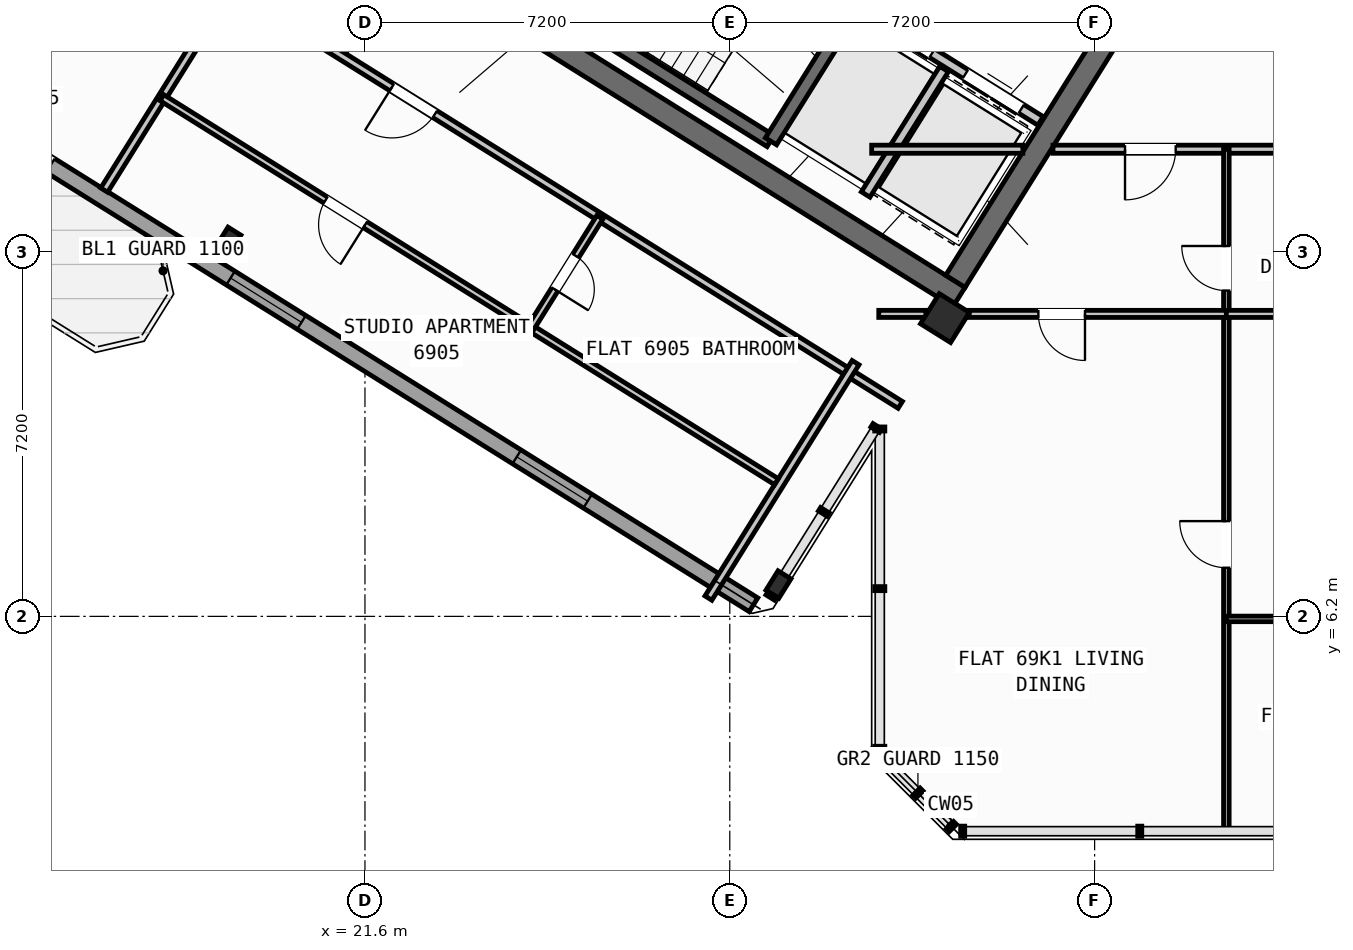
"""IFC4 building model, lengths in metres.
Left out: names, types, materials, properties, quantities, classifications, styles, units other than length and angle.
Written with IfcOpenShell. Run it as: python <this file> out.ifc"""

import sys

from ifc_helpers import new_model, si_unit, direction, frame, frame_2d, origin, origin_2d, place, context, subcontext, project, spatial, rectangle, hollow_rectangle, i_section, extrude, source, transform, mapped, element, fill, save


model = new_model("IFC4")
c1 = context("Model", 3, precision=1e-05, world=origin(), true_north=direction((0.0, 1.0)))
c2 = subcontext(c1, "Body", "Model", "MODEL_VIEW")
j1 = project(units=[si_unit("LENGTHUNIT", "METRE"), si_unit("PLANEANGLEUNIT", "RADIAN")], contexts=[c1])
p1 = place(None, origin())
s1 = spatial("IfcSite", under=j1, at=p1, CompositionType="ELEMENT")
p2 = place(p1, origin())
s2 = spatial("IfcBuilding", under=s1, at=p2, CompositionType="ELEMENT")
p3 = place(p2, frame((0.0, 0.0, 273.6)))
s3 = spatial("IfcBuildingStorey", under=s2, at=p3, CompositionType="ELEMENT", Elevation=273.6)
p4 = place(p3, frame((33.324, 12.503, 0.0), z_axis=(0.0, 0.0, 1.0), x_axis=(-0.848043529849, 0.529926571782, 0.0)))
e1 = element("IfcWall", 1, at=p4, inside=s3, PredefinedType="SHEAR", context=c2, shape_type="SweptSolid", body=[
    extrude(rectangle(XDim=13.04, YDim=0.45, at=frame_2d((6.52, 0.0))), origin(), (0.0, 0.0, 1.0), 3.35),
])
p5 = place(p3, frame((36.683, 18.304, 0.0), z_axis=(0.0, 0.0, 1.0), x_axis=(-0.529904039071, -0.848057609704, 0.0)))
e2 = element("IfcWall", 2, at=p5, inside=s3, PredefinedType="SHEAR", context=c2, shape_type="SweptSolid", body=[
    extrude(rectangle(XDim=6.475, YDim=0.45, at=frame_2d((3.238, 0.0))), origin(), (0.0, 0.0, 1.0), 3.35),
])
m1 = source(origin(), c2, "Body", "SweptSolid", [
    extrude(hollow_rectangle(XDim=0.7, YDim=0.7, WallThickness=0.028, at=origin_2d()), origin(), (0.0, 0.0, 1.0), 3.6),
])
p6 = place(p3, frame((33.046, 12.087, 0.0), z_axis=(0.0, 0.0, 1.0), x_axis=(-0.848048096156, 0.529919264233, 0.0)))
e3 = element("IfcColumn", 3, at=p6, inside=s3, PredefinedType="COLUMN", context=c2, shape_type="MappedRepresentation", body=[
    mapped(m1, transform((0.0, 0.0, 0.0), scale=1.0)),
])
m2 = source(origin(), c2, "Body", "SweptSolid", [
    extrude(i_section(OverallWidth=0.3, OverallDepth=0.45, WebThickness=0.014, FlangeThickness=0.026, at=origin_2d()), origin(), (0.0, 0.0, 1.0), 3.6),
])
for number, where, z_axis, x_axis in (
    (4, (29.761, 6.829, 0.0), (0.0, 0.0, 1.0), (-0.848, 0.53, 0.0)),
    (5, (18.906, 13.612, 0.0), (0.0, 0.0, 1.0), (-0.848, 0.53, 0.0)),
):
    element("IfcColumn", number, at=place(p3, frame(where, z_axis=z_axis, x_axis=x_axis)), inside=s3, PredefinedType="COLUMN", context=c2, shape_type="MappedRepresentation", body=[
        mapped(m2, transform((0.0, 0.0, 0.0), scale=1.0)),
    ])
p7 = place(p3, frame((29.268, 6.429, 0.0), z_axis=(0.0, 0.0, 1.0), x_axis=(-0.848049971435, 0.529916263149, 0.0)))
e6 = element("IfcWall", 6, at=p7, inside=s3, PredefinedType="STANDARD", context=c2, shape_type="SweptSolid", body=[
    extrude(rectangle(XDim=31.588, YDim=0.32, at=frame_2d((15.794, 0.0))), origin(), (0.0, 0.0, 1.0), 3.35),
])
p8 = place(p7, frame((16.362, 0.0, 0.0)))
e7 = element("IfcOpeningElement", 7, at=p8, cuts=e6, PredefinedType="OPENING", context=c2, shape_type="SweptSolid", body=[
    extrude(rectangle(XDim=1.2, YDim=2.15, at=frame_2d((0.6, 1.075))), frame((0.0, 0.17, 0.0), z_axis=(0.0, -1.0, 0.0), x_axis=(1.0, 0.0, 0.0)), (0.0, 0.0, 1.0), 0.34),
])
p9 = place(p7, frame((3.859, 0.0, 0.9)))
e8 = element("IfcOpeningElement", 8, at=p9, cuts=e6, PredefinedType="OPENING", context=c2, shape_type="SweptSolid", body=[
    extrude(rectangle(XDim=1.65, YDim=1.45, at=frame_2d((0.825, 0.725))), frame((0.0, 0.17, 0.0), z_axis=(0.0, -1.0, 0.0), x_axis=(1.0, 0.0, 0.0)), (0.0, 0.0, 1.0), 0.34),
])
p10 = place(p7, frame((10.519, 0.0, 0.9)))
e9 = element("IfcOpeningElement", 9, at=p10, cuts=e6, PredefinedType="OPENING", context=c2, shape_type="SweptSolid", body=[
    extrude(rectangle(XDim=1.65, YDim=1.45, at=frame_2d((0.825, 0.725))), frame((0.0, 0.17, 0.0), z_axis=(0.0, -1.0, 0.0), x_axis=(1.0, 0.0, 0.0)), (0.0, 0.0, 1.0), 0.34),
])
p11 = place(p7, frame((21.219, 0.0, 0.95)))
e10 = element("IfcOpeningElement", 10, at=p11, cuts=e6, PredefinedType="OPENING", context=c2, shape_type="SweptSolid", body=[
    extrude(rectangle(XDim=1.95, YDim=1.35, at=frame_2d((0.975, 0.675))), frame((0.0, 0.17, 0.0), z_axis=(0.0, -1.0, 0.0), x_axis=(1.0, 0.0, 0.0)), (0.0, 0.0, 1.0), 0.34),
])
p12 = place(p7, frame((26.406, 0.0, 1.0)))
e11 = element("IfcOpeningElement", 11, at=p12, cuts=e6, PredefinedType="OPENING", context=c2, shape_type="SweptSolid", body=[
    extrude(rectangle(XDim=0.9, YDim=1.25, at=frame_2d((0.45, 0.625))), frame((0.0, 0.17, 0.0), z_axis=(0.0, -1.0, 0.0), x_axis=(1.0, 0.0, 0.0)), (0.0, 0.0, 1.0), 0.34),
])
p13 = place(p7, frame((29.143, 0.0, 0.9)))
e12 = element("IfcOpeningElement", 12, at=p13, cuts=e6, PredefinedType="OPENING", context=c2, shape_type="SweptSolid", body=[
    extrude(rectangle(XDim=1.65, YDim=1.45, at=frame_2d((0.825, 0.725))), frame((0.0, 0.17, 0.0), z_axis=(0.0, -1.0, 0.0), x_axis=(1.0, 0.0, 0.0)), (0.0, 0.0, 1.0), 0.34),
])
p14 = place(p3, frame((29.605, 15.581, 0.0), z_axis=(0.0, 0.0, 1.0), x_axis=(-0.848036911448, 0.529937163087, 0.0)))
e13 = element("IfcWall", 13, at=p14, inside=s3, PredefinedType="SHEAR", context=c2, shape_type="SweptSolid", body=[
    extrude(rectangle(XDim=7.46, YDim=0.26, at=frame_2d((3.73, 0.0))), origin(), (0.0, 0.0, 1.0), 3.35),
])
p15 = place(p3, frame((31.288, 18.256, 0.0), z_axis=(0.0, 0.0, 1.0), x_axis=(-0.529943379326, -0.848033026897, 0.0)))
e14 = element("IfcWall", 14, at=p15, inside=s3, PredefinedType="SHEAR", context=c2, shape_type="SweptSolid", body=[
    extrude(rectangle(XDim=3.16, YDim=0.26, at=frame_2d((1.58, 0.0))), origin(), (0.0, 0.0, 1.0), 3.35),
])
p16 = place(p3, frame((34.933, 15.978, 0.0), z_axis=(0.0, 0.0, 1.0), x_axis=(-0.848055739377, 0.529907032327, 0.0)))
e15 = element("IfcWall", 15, at=p16, inside=s3, PredefinedType="STANDARD", context=c2, shape_type="SweptSolid", body=[
    extrude(rectangle(XDim=4.298, YDim=0.2, at=frame_2d((2.149, 0.0))), origin(), (0.0, 0.0, 1.0), 3.34),
])
p17 = place(p16, frame((0.448, 0.0, 0.0)))
e16 = element("IfcOpeningElement", 16, at=p17, cuts=e15, PredefinedType="OPENING", context=c2, shape_type="SweptSolid", body=[
    extrude(rectangle(XDim=1.3, YDim=2.2, at=frame_2d((0.65, 1.1))), frame((0.0, 0.11, 0.0), z_axis=(0.0, -1.0, 0.0), x_axis=(1.0, 0.0, 0.0)), (0.0, 0.0, 1.0), 0.22),
])
p18 = place(p16, frame((2.523, 0.0, 0.0)))
e17 = element("IfcOpeningElement", 17, at=p18, cuts=e15, PredefinedType="OPENING", context=c2, shape_type="SweptSolid", body=[
    extrude(rectangle(XDim=1.45, YDim=2.25, at=frame_2d((0.725, 1.125))), frame((0.0, 0.11, 0.0), z_axis=(0.0, -1.0, 0.0), x_axis=(1.0, 0.0, 0.0)), (0.0, 0.0, 1.0), 0.22),
])
p19 = place(p3, frame((33.029, 17.003, 0.0), z_axis=(0.0, 0.0, 1.0), x_axis=(-0.529916267533, -0.848049968695, 0.0)))
e18 = element("IfcWall", 18, at=p19, inside=s3, PredefinedType="STANDARD", context=c2, shape_type="SweptSolid", body=[
    extrude(rectangle(XDim=2.92, YDim=0.2, at=frame_2d((1.46, 0.0))), origin(), (0.0, 0.0, 1.0), 3.34),
])
p20 = place(p3, frame((21.206, 17.292, 0.0), z_axis=(0.0, 0.0, 1.0), x_axis=(-0.848050851465, 0.529914854792, 0.0)))
e19 = element("IfcWall", 19, at=p20, inside=s3, PredefinedType="PARTITIONING", context=c2, shape_type="SweptSolid", body=[
    extrude(rectangle(XDim=2.61, YDim=0.16, at=frame_2d((1.305, 0.0))), origin(), (0.0, 0.0, 1.0), 3.34),
])
p21 = place(p3, frame((21.329, 22.416, 0.0), z_axis=(0.0, 0.0, 1.0), x_axis=(-0.529920220799, -0.848047498427, 0.0)))
e20 = element("IfcWall", 20, at=p21, inside=s3, PredefinedType="PARTITIONING", context=c2, shape_type="SweptSolid", body=[
    extrude(rectangle(XDim=9.2, YDim=0.16, at=frame_2d((4.6, 0.0))), origin(), (0.0, 0.0, 1.0), 3.34),
])
p22 = place(p3, frame((16.572, 21.954, 0.0), z_axis=(0.0, 0.0, 1.0), x_axis=(-0.529904903214, -0.848057069748, 0.0)))
e21 = element("IfcWall", 21, at=p22, inside=s3, PredefinedType="PARTITIONING", context=c2, shape_type="SweptSolid", body=[
    extrude(rectangle(XDim=5.601, YDim=0.16, at=frame_2d((2.801, 0.0))), origin(), (0.0, 0.0, 1.0), 2.875),
])
p23 = place(p3, frame((32.164, 10.374, 0.0), z_axis=(0.0, 0.0, 1.0), x_axis=(-0.848044107957, 0.529925646633, 0.0)))
e22 = element("IfcWall", 22, at=p23, inside=s3, PredefinedType="PARTITIONING", context=c2, shape_type="SweptSolid", body=[
    extrude(rectangle(XDim=15.57, YDim=0.16, at=frame_2d((7.785, 0.0))), origin(), (0.0, 0.0, 1.0), 3.34),
])
p24 = place(p23, frame((10.83, 0.0, 0.0)))
e23 = element("IfcOpeningElement", 23, at=p24, cuts=e22, PredefinedType="OPENING", context=c2, shape_type="SweptSolid", body=[
    extrude(rectangle(XDim=1.0, YDim=2.1, at=frame_2d((0.5, 1.05))), frame((0.0, 0.09, 0.0), z_axis=(0.0, -1.0, 0.0), x_axis=(1.0, 0.0, 0.0)), (0.0, 0.0, 1.0), 0.18),
])
p25 = place(p3, frame((31.282, 11.208, 0.0), z_axis=(0.0, 0.0, 1.0), x_axis=(-0.529938869374, -0.84803584519, 0.0)))
e24 = element("IfcWall", 24, at=p25, inside=s3, PredefinedType="PARTITIONING", context=c2, shape_type="SweptSolid", body=[
    extrude(rectangle(XDim=5.48, YDim=0.16, at=frame_2d((2.74, 0.0))), origin(), (0.0, 0.0, 1.0), 3.34),
])
p26 = place(p3, frame((29.72, 8.859, 0.0), z_axis=(0.0, 0.0, 1.0), x_axis=(-0.848049134363, 0.529917602752, 0.0)))
e25 = element("IfcWall", 25, at=p26, inside=s3, PredefinedType="PLUMBINGWALL", context=c2, shape_type="SweptSolid", body=[
    extrude(rectangle(XDim=14.3, YDim=0.14, at=frame_2d((7.15, 0.0))), origin(), (0.0, 0.0, 1.0), 3.34),
])
p27 = place(p26, frame((9.57, 0.0, 0.0)))
e26 = element("IfcOpeningElement", 26, at=p27, cuts=e25, PredefinedType="OPENING", context=c2, shape_type="SweptSolid", body=[
    extrude(rectangle(XDim=0.92, YDim=2.08, at=frame_2d((0.46, 1.04))), frame((0.0, 0.08, 0.0), z_axis=(0.0, -1.0, 0.0), x_axis=(1.0, 0.0, 0.0)), (0.0, 0.0, 1.0), 0.16),
])
p28 = place(p3, frame((26.237, 14.078, 0.0), z_axis=(0.0, 0.0, 1.0), x_axis=(-0.52995640672, -0.848024885824, 0.0)))
e27 = element("IfcWall", 27, at=p28, inside=s3, PredefinedType="PLUMBINGWALL", context=c2, shape_type="SweptSolid", body=[
    extrude(rectangle(XDim=2.58, YDim=0.14, at=frame_2d((1.29, 0.0))), origin(), (0.0, 0.0, 1.0), 3.34),
])
p29 = place(p28, frame((0.9, 0.0, 0.0)))
e28 = element("IfcOpeningElement", 28, at=p29, cuts=e27, PredefinedType="OPENING", context=c2, shape_type="SweptSolid", body=[
    extrude(rectangle(XDim=0.78, YDim=2.05, at=frame_2d((0.39, 1.025))), frame((0.0, 0.08, 0.0), z_axis=(0.0, -1.0, 0.0), x_axis=(1.0, 0.0, 0.0)), (0.0, 0.0, 1.0), 0.16),
])
p30 = place(p3, frame((31.6, 15.42, 0.0), z_axis=(0.0, 0.0, 1.0), x_axis=(1.0, 0.0, 0.0)))
e29 = element("IfcWall", 29, at=p30, inside=s3, PredefinedType="PARTITIONING", context=c2, shape_type="SweptSolid", body=[
    extrude(rectangle(XDim=2.984, YDim=0.16, at=frame_2d((1.492, 0.0))), origin(), (0.0, 0.0, 1.0), 3.34),
])
p31 = place(p3, frame((35.178, 15.42, 0.0), z_axis=(0.0, 0.0, 1.0), x_axis=(1.0, 0.0, 0.0)))
e30 = element("IfcWall", 30, at=p31, inside=s3, PredefinedType="PARTITIONING", context=c2, shape_type="SweptSolid", body=[
    extrude(rectangle(XDim=9.021, YDim=0.16, at=frame_2d((4.511, 0.0))), origin(), (0.0, 0.0, 1.0), 3.34),
])
p32 = place(p31, frame((1.422, 0.0, 0.0)))
e31 = element("IfcOpeningElement", 31, at=p32, cuts=e30, PredefinedType="OPENING", context=c2, shape_type="SweptSolid", body=[
    extrude(rectangle(XDim=1.0, YDim=2.1, at=frame_2d((0.5, 1.05))), frame((0.0, 0.09, 0.0), z_axis=(0.0, -1.0, 0.0), x_axis=(1.0, 0.0, 0.0)), (0.0, 0.0, 1.0), 0.18),
])
p33 = place(p3, frame((38.6, 1.96, 0.0), z_axis=(0.0, 0.0, 1.0), x_axis=(0.0, 1.0, 0.0)))
e32 = element("IfcWall", 32, at=p33, inside=s3, PredefinedType="PARTITIONING", context=c2, shape_type="SweptSolid", body=[
    extrude(rectangle(XDim=13.46, YDim=0.11, at=frame_2d((6.73, 0.0))), origin(), (0.0, 0.0, 1.0), 3.34),
])
p34 = place(p33, frame((5.2, 0.0, 0.0)))
e33 = element("IfcOpeningElement", 33, at=p34, cuts=e32, PredefinedType="OPENING", context=c2, shape_type="SweptSolid", body=[
    extrude(rectangle(XDim=0.92, YDim=2.08, at=frame_2d((0.46, 1.04))), frame((0.0, 0.065, 0.0), z_axis=(0.0, -1.0, 0.0), x_axis=(1.0, 0.0, 0.0)), (0.0, 0.0, 1.0), 0.13),
])
p35 = place(p33, frame((10.67, 0.0, 0.0)))
e34 = element("IfcOpeningElement", 34, at=p35, cuts=e32, PredefinedType="OPENING", context=c2, shape_type="SweptSolid", body=[
    extrude(rectangle(XDim=0.88, YDim=2.08, at=frame_2d((0.44, 1.04))), frame((0.0, 0.065, 0.0), z_axis=(0.0, -1.0, 0.0), x_axis=(1.0, 0.0, 0.0)), (0.0, 0.0, 1.0), 0.13),
])
p36 = place(p3, frame((31.74, 12.17, 0.0), z_axis=(0.0, 0.0, 1.0), x_axis=(1.0, 0.0, 0.0)))
e35 = element("IfcWall", 35, at=p36, inside=s3, PredefinedType="PLUMBINGWALL", context=c2, shape_type="SweptSolid", body=[
    extrude(rectangle(XDim=0.931, YDim=0.14, at=frame_2d((0.466, 0.0))), origin(), (0.0, 0.0, 1.0), 3.34),
])
p37 = place(p3, frame((33.525, 12.17, 0.0), z_axis=(0.0, 0.0, 1.0), x_axis=(1.0, 0.0, 0.0)))
e36 = element("IfcWall", 36, at=p37, inside=s3, PredefinedType="PLUMBINGWALL", context=c2, shape_type="SweptSolid", body=[
    extrude(rectangle(XDim=5.075, YDim=0.14, at=frame_2d((2.538, 0.0))), origin(), (0.0, 0.0, 1.0), 3.34),
])
p38 = place(p37, frame((1.365, 0.0, 0.0)))
e37 = element("IfcOpeningElement", 37, at=p38, cuts=e36, PredefinedType="OPENING", context=c2, shape_type="SweptSolid", body=[
    extrude(rectangle(XDim=0.92, YDim=2.08, at=frame_2d((0.46, 1.04))), frame((0.0, 0.08, 0.0), z_axis=(0.0, -1.0, 0.0), x_axis=(1.0, 0.0, 0.0)), (0.0, 0.0, 1.0), 0.16),
])
p39 = place(p3, frame((38.6, 12.17, 0.0), z_axis=(0.0, 0.0, 1.0), x_axis=(1.0, 0.0, 0.0)))
e38 = element("IfcWall", 38, at=p39, inside=s3, PredefinedType="PLUMBINGWALL", context=c2, shape_type="SweptSolid", body=[
    extrude(rectangle(XDim=5.46, YDim=0.14, at=frame_2d((2.73, 0.0))), origin(), (0.0, 0.0, 1.0), 3.34),
])
p40 = place(p3, frame((38.6, 6.15, 0.0), z_axis=(0.0, 0.0, 1.0), x_axis=(1.0, 0.0, 0.0)))
e39 = element("IfcWall", 39, at=p40, inside=s3, PredefinedType="PARTITIONING", context=c2, shape_type="SweptSolid", body=[
    extrude(rectangle(XDim=5.46, YDim=0.11, at=frame_2d((2.73, 0.0))), origin(), (0.0, 0.0, 1.0), 3.34),
])
p41 = place(p40, frame((2.19, 0.0, 0.0)))
e40 = element("IfcOpeningElement", 40, at=p41, cuts=e39, PredefinedType="OPENING", context=c2, shape_type="SweptSolid", body=[
    extrude(rectangle(XDim=0.92, YDim=2.08, at=frame_2d((0.46, 1.04))), frame((0.0, 0.065, 0.0), z_axis=(0.0, -1.0, 0.0), x_axis=(1.0, 0.0, 0.0)), (0.0, 0.0, 1.0), 0.13),
])
m3 = source(origin(), c2, "Body", "SweptSolid", [
    extrude(rectangle(XDim=1.65, YDim=1.45, at=frame_2d((0.825, 0.725))), frame((0.0, 0.03, 0.0), z_axis=(0.0, -1.0, 0.0), x_axis=(1.0, 0.0, 0.0)), (0.0, 0.0, 1.0), 0.06),
])
p42 = place(p9, origin())
e41 = element("IfcWindow", 41, at=p42, inside=s3, PartitioningType="SINGLE_PANEL", PredefinedType="WINDOW", context=c2, shape_type="MappedRepresentation", body=[
    mapped(m3, transform((0.0, 0.0, 0.0), scale=1.0)),
])
fill(e8, e41)
p43 = place(p10, origin())
e42 = element("IfcWindow", 42, at=p43, inside=s3, PartitioningType="SINGLE_PANEL", PredefinedType="WINDOW", context=c2, shape_type="MappedRepresentation", body=[
    mapped(m3, transform((0.0, 0.0, 0.0), scale=1.0)),
])
fill(e9, e42)
m4 = source(origin(), c2, "Body", "SweptSolid", [
    extrude(rectangle(XDim=1.3, YDim=2.2, at=frame_2d((0.65, 1.1))), frame((0.0, 0.025, 0.0), z_axis=(0.0, -1.0, 0.0), x_axis=(1.0, 0.0, 0.0)), (0.0, 0.0, 1.0), 0.05),
])
p44 = place(p17, origin())
e43 = element("IfcDoor", 43, at=p44, inside=s3, OperationType="DOUBLE_DOOR_SLIDING", PredefinedType="DOOR", context=c2, shape_type="MappedRepresentation", body=[
    mapped(m4, transform((0.0, 0.0, 0.0), scale=1.0)),
])
fill(e16, e43)
m5 = source(origin(), c2, "Body", "SweptSolid", [
    extrude(rectangle(XDim=1.45, YDim=2.25, at=frame_2d((0.725, 1.125))), frame((0.0, 0.025, 0.0), z_axis=(0.0, -1.0, 0.0), x_axis=(1.0, 0.0, 0.0)), (0.0, 0.0, 1.0), 0.05),
])
p45 = place(p18, origin())
e44 = element("IfcDoor", 44, at=p45, inside=s3, OperationType="DOUBLE_DOOR_SLIDING", PredefinedType="DOOR", context=c2, shape_type="MappedRepresentation", body=[
    mapped(m5, transform((0.0, 0.0, 0.0), scale=1.0)),
])
fill(e17, e44)
m6 = source(origin(), c2, "Body", "SweptSolid", [
    extrude(rectangle(XDim=1.0, YDim=2.1, at=frame_2d((0.5, 1.05))), frame((0.0, 0.025, 0.0), z_axis=(0.0, -1.0, 0.0), x_axis=(1.0, 0.0, 0.0)), (0.0, 0.0, 1.0), 0.05),
])
p46 = place(p24, origin())
e45 = element("IfcDoor", 45, at=p46, inside=s3, OperationType="SINGLE_SWING_RIGHT", PredefinedType="DOOR", context=c2, shape_type="MappedRepresentation", body=[
    mapped(m6, transform((0.0, 0.0, 0.0), scale=1.0)),
])
fill(e23, e45)
m7 = source(origin(), c2, "Body", "SweptSolid", [
    extrude(rectangle(XDim=0.92, YDim=2.08, at=frame_2d((0.46, 1.04))), frame((0.0, 0.025, 0.0), z_axis=(0.0, -1.0, 0.0), x_axis=(1.0, 0.0, 0.0)), (0.0, 0.0, 1.0), 0.05),
])
p47 = place(p27, origin())
e46 = element("IfcDoor", 46, at=p47, inside=s3, OperationType="SINGLE_SWING_LEFT", PredefinedType="DOOR", context=c2, shape_type="MappedRepresentation", body=[
    mapped(m7, transform((0.0, 0.0, 0.0), scale=1.0)),
])
fill(e26, e46)
m8 = source(origin(), c2, "Body", "SweptSolid", [
    extrude(rectangle(XDim=0.78, YDim=2.05, at=frame_2d((0.39, 1.025))), frame((0.0, 0.025, 0.0), z_axis=(0.0, -1.0, 0.0), x_axis=(1.0, 0.0, 0.0)), (0.0, 0.0, 1.0), 0.05),
])
p48 = place(p29, origin())
e47 = element("IfcDoor", 47, at=p48, inside=s3, OperationType="SINGLE_SWING_RIGHT", PredefinedType="DOOR", context=c2, shape_type="MappedRepresentation", body=[
    mapped(m8, transform((0.0, 0.0, 0.0), scale=1.0)),
])
fill(e28, e47)
p49 = place(p34, origin())
e48 = element("IfcDoor", 48, at=p49, inside=s3, OperationType="SINGLE_SWING_RIGHT", PredefinedType="DOOR", context=c2, shape_type="MappedRepresentation", body=[
    mapped(m7, transform((0.0, 0.0, 0.0), scale=1.0)),
])
fill(e33, e48)
p50 = place(p32, frame((1.0, 0.0, 0.0), z_axis=(0.0, 0.0, 1.0), x_axis=(-1.0, 0.0, 0.0)))
e49 = element("IfcDoor", 49, at=p50, inside=s3, OperationType="SINGLE_SWING_RIGHT", PredefinedType="DOOR", context=c2, shape_type="MappedRepresentation", body=[
    mapped(m6, transform((0.0, 0.0, 0.0), scale=1.0)),
])
fill(e31, e49)
p51 = place(p38, frame((0.92, 0.0, 0.0), z_axis=(0.0, 0.0, 1.0), x_axis=(-1.0, 0.0, 0.0)))
e50 = element("IfcDoor", 50, at=p51, inside=s3, OperationType="SINGLE_SWING_LEFT", PredefinedType="DOOR", context=c2, shape_type="MappedRepresentation", body=[
    mapped(m7, transform((0.0, 0.0, 0.0), scale=1.0)),
])
fill(e37, e50)
m9 = source(origin(), c2, "Body", "SweptSolid", [
    extrude(rectangle(XDim=0.88, YDim=2.08, at=frame_2d((0.44, 1.04))), frame((0.0, 0.025, 0.0), z_axis=(0.0, -1.0, 0.0), x_axis=(1.0, 0.0, 0.0)), (0.0, 0.0, 1.0), 0.05),
])
p52 = place(p35, origin())
e51 = element("IfcDoor", 51, at=p52, inside=s3, OperationType="SINGLE_SWING_RIGHT", PredefinedType="DOOR", context=c2, shape_type="MappedRepresentation", body=[
    mapped(m9, transform((0.0, 0.0, 0.0), scale=1.0)),
])
fill(e34, e51)
save(model, sys.argv[1])
